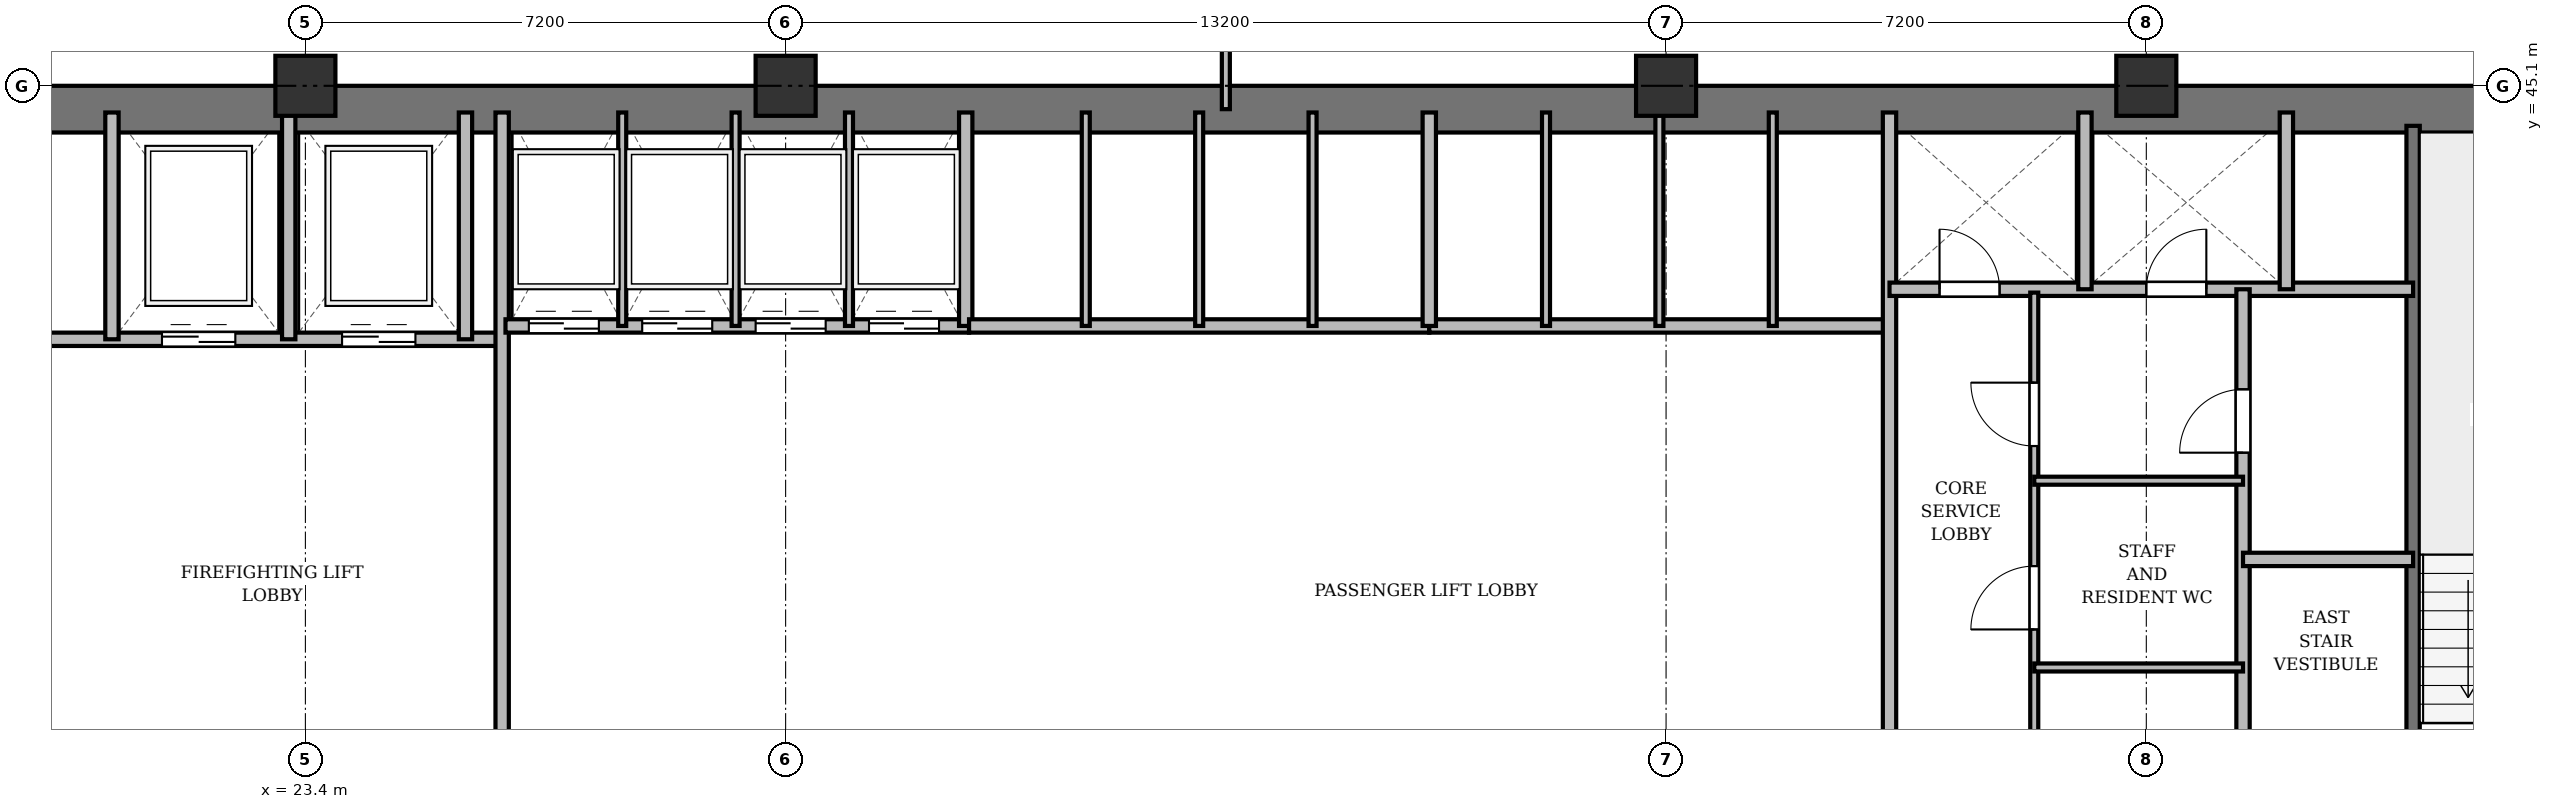
"""IFC4 building model, lengths in metres.
Left out: names, types, materials, properties, quantities, classifications, styles, units other than length and angle.
Written with IfcOpenShell. Run it as: python <this file> out.ifc"""

import sys

from ifc_helpers import new_model, si_unit, direction, frame, frame_2d, origin, origin_2d, place, context, subcontext, project, spatial, rectangle, extrude, source, transform, mapped, element, fill, save


model = new_model("IFC4")
c1 = context("Model", 3, precision=1e-05, world=origin(), true_north=direction((0.0, 1.0)))
c2 = subcontext(c1, "Body", "Model", "MODEL_VIEW")
j1 = project(units=[si_unit("LENGTHUNIT", "METRE"), si_unit("PLANEANGLEUNIT", "RADIAN")], contexts=[c1])
p1 = place(None, origin())
s1 = spatial("IfcSite", under=j1, at=p1, CompositionType="ELEMENT")
p2 = place(p1, origin())
s2 = spatial("IfcBuilding", under=s1, at=p2, CompositionType="ELEMENT")
p3 = place(p2, frame((0.0, 0.0, 63.1)))
s3 = spatial("IfcBuildingStorey", under=s2, at=p3, CompositionType="ELEMENT", Elevation=63.1)
m1 = source(origin(), c2, "Body", "SweptSolid", [
    extrude(rectangle(XDim=0.9, YDim=0.9, at=origin_2d()), origin(), (0.0, 0.0, 1.0), 3.6),
])
for number, where, z_axis, x_axis in (
    (1, (23.4, 45.1, 0.0), (0.0, 0.0, 1.0), (1.0, 0.0, 0.0)),
    (2, (30.6, 45.1, 0.0), (0.0, 0.0, 1.0), (1.0, 0.0, 0.0)),
    (3, (43.8, 45.1, 0.0), (0.0, 0.0, 1.0), (1.0, 0.0, 0.0)),
    (4, (51.0, 45.1, 0.0), (0.0, 0.0, 1.0), (1.0, 0.0, 0.0)),
):
    element("IfcColumn", number, at=place(p3, frame(where, z_axis=z_axis, x_axis=x_axis)), inside=s3, PredefinedType="COLUMN", context=c2, shape_type="MappedRepresentation", body=[
        mapped(m1, transform((0.0, 0.0, 0.0), x_axis=(1.0, 0.0, 0.0), y_axis=(0.0, 1.0, 0.0), z_axis=(0.0, 0.0, 1.0), scale=1.0)),
    ])
p4 = place(p3, frame((15.5, 44.75, 0.0), z_axis=(0.0, 0.0, 1.0), x_axis=(1.0, 0.0, 0.0)))
e5 = element("IfcWall", 5, at=p4, inside=s3, PredefinedType="SHEAR", context=c2, shape_type="SweptSolid", body=[
    extrude(rectangle(XDim=43.4, YDim=0.7, at=frame_2d((21.7, 0.0))), origin(), (0.0, 0.0, 1.0), 3.34),
])
p5 = place(p3, frame((55.0, 33.4, 0.0), z_axis=(0.0, 0.0, 1.0), x_axis=(0.0, 1.0, 0.0)))
e6 = element("IfcWall", 6, at=p5, inside=s3, PredefinedType="SHEAR", context=c2, shape_type="SweptSolid", body=[
    extrude(rectangle(XDim=11.1, YDim=0.2, at=frame_2d((5.55, 0.0))), origin(), (0.0, 0.0, 1.0), 3.34),
])
p6 = place(p5, frame((0.85, 0.0, 0.0)))
e7 = element("IfcOpeningElement", 7, at=p6, cuts=e6, PredefinedType="OPENING", context=c2, shape_type="SweptSolid", body=[
    extrude(rectangle(XDim=1.1, YDim=2.15, at=frame_2d((0.55, 1.075))), frame((0.0, 0.11, 0.0), z_axis=(0.0, -1.0, 0.0), x_axis=(1.0, 0.0, 0.0)), (0.0, 0.0, 1.0), 0.22),
])
p7 = place(p3, frame((19.55, 41.3, 0.0), z_axis=(0.0, 0.0, 1.0), x_axis=(1.0, 0.0, 0.0)))
e8 = element("IfcWall", 8, at=p7, inside=s3, PredefinedType="SOLIDWALL", context=c2, shape_type="SweptSolid", body=[
    extrude(rectangle(XDim=6.75, YDim=0.2, at=frame_2d((3.375, 0.0))), origin(), (0.0, 0.0, 1.0), 3.34),
])
p8 = place(p7, frame((1.7, 0.0, 0.0)))
e9 = element("IfcOpeningElement", 9, at=p8, cuts=e8, PredefinedType="OPENING", context=c2, shape_type="SweptSolid", body=[
    extrude(rectangle(XDim=1.1, YDim=2.15, at=frame_2d((0.55, 1.075))), frame((0.0, 0.11, 0.0), z_axis=(0.0, -1.0, 0.0), x_axis=(1.0, 0.0, 0.0)), (0.0, 0.0, 1.0), 0.22),
])
p9 = place(p7, frame((4.4, 0.0, 0.0)))
e10 = element("IfcOpeningElement", 10, at=p9, cuts=e8, PredefinedType="OPENING", context=c2, shape_type="SweptSolid", body=[
    extrude(rectangle(XDim=1.1, YDim=2.15, at=frame_2d((0.55, 1.075))), frame((0.0, 0.11, 0.0), z_axis=(0.0, -1.0, 0.0), x_axis=(1.0, 0.0, 0.0)), (0.0, 0.0, 1.0), 0.22),
])
for number, where, z_axis, x_axis in (
    (11, (20.5, 41.3, 0.0), (0.0, 0.0, 1.0), (0.0, 1.0, 0.0)),
    (12, (23.15, 41.3, 0.0), (0.0, 0.0, 1.0), (0.0, 1.0, 0.0)),
    (13, (25.8, 41.3, 0.0), (0.0, 0.0, 1.0), (0.0, 1.0, 0.0)),
):
    element("IfcWall", number, at=place(p3, frame(where, z_axis=z_axis, x_axis=x_axis)), inside=s3, PredefinedType="SOLIDWALL", context=c2, shape_type="SweptSolid", body=[
        extrude(rectangle(XDim=3.4, YDim=0.2, at=frame_2d((1.7, 0.0))), origin(), (0.0, 0.0, 1.0), 3.34),
    ])
p10 = place(p3, frame((26.35, 33.4, 0.0), z_axis=(0.0, 0.0, 1.0), x_axis=(0.0, 1.0, 0.0)))
e14 = element("IfcWall", 14, at=p10, inside=s3, PredefinedType="SOLIDWALL", context=c2, shape_type="SweptSolid", body=[
    extrude(rectangle(XDim=11.3, YDim=0.2, at=frame_2d((5.65, 0.0))), origin(), (0.0, 0.0, 1.0), 2.69),
])
p11 = place(p3, frame((26.4, 41.5, 0.0), z_axis=(0.0, 0.0, 1.0), x_axis=(1.0, 0.0, 0.0)))
e15 = element("IfcWall", 15, at=p11, inside=s3, PredefinedType="SOLIDWALL", context=c2, shape_type="SweptSolid", body=[
    extrude(rectangle(XDim=6.95, YDim=0.2, at=frame_2d((3.475, 0.0))), origin(), (0.0, 0.0, 1.0), 3.34),
])
p12 = place(p11, frame((0.35, 0.0, 0.0)))
e16 = element("IfcOpeningElement", 16, at=p12, cuts=e15, PredefinedType="OPENING", context=c2, shape_type="SweptSolid", body=[
    extrude(rectangle(XDim=1.05, YDim=2.15, at=frame_2d((0.525, 1.075))), frame((0.0, 0.11, 0.0), z_axis=(0.0, -1.0, 0.0), x_axis=(1.0, 0.0, 0.0)), (0.0, 0.0, 1.0), 0.22),
])
p13 = place(p11, frame((2.05, 0.0, 0.0)))
e17 = element("IfcOpeningElement", 17, at=p13, cuts=e15, PredefinedType="OPENING", context=c2, shape_type="SweptSolid", body=[
    extrude(rectangle(XDim=1.05, YDim=2.15, at=frame_2d((0.525, 1.075))), frame((0.0, 0.11, 0.0), z_axis=(0.0, -1.0, 0.0), x_axis=(1.0, 0.0, 0.0)), (0.0, 0.0, 1.0), 0.22),
])
p14 = place(p11, frame((3.75, 0.0, 0.0)))
e18 = element("IfcOpeningElement", 18, at=p14, cuts=e15, PredefinedType="OPENING", context=c2, shape_type="SweptSolid", body=[
    extrude(rectangle(XDim=1.05, YDim=2.15, at=frame_2d((0.525, 1.075))), frame((0.0, 0.11, 0.0), z_axis=(0.0, -1.0, 0.0), x_axis=(1.0, 0.0, 0.0)), (0.0, 0.0, 1.0), 0.22),
])
p15 = place(p11, frame((5.45, 0.0, 0.0)))
e19 = element("IfcOpeningElement", 19, at=p15, cuts=e15, PredefinedType="OPENING", context=c2, shape_type="SweptSolid", body=[
    extrude(rectangle(XDim=1.05, YDim=2.15, at=frame_2d((0.525, 1.075))), frame((0.0, 0.11, 0.0), z_axis=(0.0, -1.0, 0.0), x_axis=(1.0, 0.0, 0.0)), (0.0, 0.0, 1.0), 0.22),
])
p16 = place(p3, frame((33.3, 41.5, 0.0), z_axis=(0.0, 0.0, 1.0), x_axis=(0.0, 1.0, 0.0)))
e20 = element("IfcWall", 20, at=p16, inside=s3, PredefinedType="SOLIDWALL", context=c2, shape_type="SweptSolid", body=[
    extrude(rectangle(XDim=3.2, YDim=0.2, at=frame_2d((1.6, 0.0))), origin(), (0.0, 0.0, 1.0), 3.34),
])
for number, where, z_axis, x_axis in (
    (21, (28.15, 41.5, 0.0), (0.0, 0.0, 1.0), (0.0, 1.0, 0.0)),
    (22, (29.85, 41.5, 0.0), (0.0, 0.0, 1.0), (0.0, 1.0, 0.0)),
    (23, (31.55, 41.5, 0.0), (0.0, 0.0, 1.0), (0.0, 1.0, 0.0)),
):
    element("IfcWall", number, at=place(p3, frame(where, z_axis=z_axis, x_axis=x_axis)), inside=s3, PredefinedType="PARTITIONING", context=c2, shape_type="SweptSolid", body=[
        extrude(rectangle(XDim=3.2, YDim=0.12, at=frame_2d((1.6, 0.0))), origin(), (0.0, 0.0, 1.0), 3.34),
    ])
p17 = place(p3, frame((33.35, 41.5, 0.0), z_axis=(0.0, 0.0, 1.0), x_axis=(1.0, 0.0, 0.0)))
e24 = element("IfcWall", 24, at=p17, inside=s3, PredefinedType="SOLIDWALL", context=c2, shape_type="SweptSolid", body=[
    extrude(rectangle(XDim=6.9, YDim=0.2, at=frame_2d((3.45, 0.0))), origin(), (0.0, 0.0, 1.0), 3.34),
])
for number, where, z_axis, x_axis in (
    (25, (35.1, 41.5, 0.0), (0.0, 0.0, 1.0), (0.0, 1.0, 0.0)),
    (26, (36.8, 41.5, 0.0), (0.0, 0.0, 1.0), (0.0, 1.0, 0.0)),
    (27, (38.5, 41.5, 0.0), (0.0, 0.0, 1.0), (0.0, 1.0, 0.0)),
):
    element("IfcWall", number, at=place(p3, frame(where, z_axis=z_axis, x_axis=x_axis)), inside=s3, PredefinedType="PARTITIONING", context=c2, shape_type="SweptSolid", body=[
        extrude(rectangle(XDim=3.2, YDim=0.12, at=frame_2d((1.6, 0.0))), origin(), (0.0, 0.0, 1.0), 3.34),
    ])
p18 = place(p3, frame((40.25, 41.5, 0.0), z_axis=(0.0, 0.0, 1.0), x_axis=(1.0, 0.0, 0.0)))
e28 = element("IfcWall", 28, at=p18, inside=s3, PredefinedType="SOLIDWALL", context=c2, shape_type="SweptSolid", body=[
    extrude(rectangle(XDim=6.9, YDim=0.2, at=frame_2d((3.45, 0.0))), origin(), (0.0, 0.0, 1.0), 2.752),
])
p19 = place(p3, frame((40.25, 41.5, 0.0), z_axis=(0.0, 0.0, 1.0), x_axis=(0.0, 1.0, 0.0)))
e29 = element("IfcWall", 29, at=p19, inside=s3, PredefinedType="SOLIDWALL", context=c2, shape_type="SweptSolid", body=[
    extrude(rectangle(XDim=3.2, YDim=0.2, at=frame_2d((1.6, 0.0))), origin(), (0.0, 0.0, 1.0), 3.34),
])
p20 = place(p3, frame((42.0, 41.5, 0.0), z_axis=(0.0, 0.0, 1.0), x_axis=(0.0, 1.0, 0.0)))
e30 = element("IfcWall", 30, at=p20, inside=s3, PredefinedType="PARTITIONING", context=c2, shape_type="SweptSolid", body=[
    extrude(rectangle(XDim=3.2, YDim=0.12, at=frame_2d((1.6, 0.0))), origin(), (0.0, 0.0, 1.0), 3.34),
])
p21 = place(p3, frame((43.7, 41.5, 0.0), z_axis=(0.0, 0.0, 1.0), x_axis=(0.0, 1.0, 0.0)))
e31 = element("IfcWall", 31, at=p21, inside=s3, PredefinedType="PARTITIONING", context=c2, shape_type="SweptSolid", body=[
    extrude(rectangle(XDim=3.2, YDim=0.12, at=frame_2d((1.6, 0.0))), origin(), (0.0, 0.0, 1.0), 2.752),
])
p22 = place(p3, frame((45.4, 41.5, 0.0), z_axis=(0.0, 0.0, 1.0), x_axis=(0.0, 1.0, 0.0)))
e32 = element("IfcWall", 32, at=p22, inside=s3, PredefinedType="PARTITIONING", context=c2, shape_type="SweptSolid", body=[
    extrude(rectangle(XDim=3.2, YDim=0.12, at=frame_2d((1.6, 0.0))), origin(), (0.0, 0.0, 1.0), 3.34),
])
p23 = place(p3, frame((47.15, 33.4, 0.0), z_axis=(0.0, 0.0, 1.0), x_axis=(0.0, 1.0, 0.0)))
e33 = element("IfcWall", 33, at=p23, inside=s3, PredefinedType="SOLIDWALL", context=c2, shape_type="SweptSolid", body=[
    extrude(rectangle(XDim=11.3, YDim=0.2, at=frame_2d((5.65, 0.0))), origin(), (0.0, 0.0, 1.0), 2.69),
])
p24 = place(p3, frame((47.15, 42.05, 0.0), z_axis=(0.0, 0.0, 1.0), x_axis=(1.0, 0.0, 0.0)))
e34 = element("IfcWall", 34, at=p24, inside=s3, PredefinedType="SOLIDWALL", context=c2, shape_type="SweptSolid", body=[
    extrude(rectangle(XDim=7.85, YDim=0.2, at=frame_2d((3.925, 0.0))), origin(), (0.0, 0.0, 1.0), 2.752),
])
p25 = place(p24, frame((0.75, 0.0, 0.0)))
e35 = element("IfcOpeningElement", 35, at=p25, cuts=e34, PredefinedType="OPENING", context=c2, shape_type="SweptSolid", body=[
    extrude(rectangle(XDim=0.9, YDim=2.1, at=frame_2d((0.45, 1.05))), frame((0.0, 0.11, 0.0), z_axis=(0.0, -1.0, 0.0), x_axis=(1.0, 0.0, 0.0)), (0.0, 0.0, 1.0), 0.22),
])
p26 = place(p24, frame((3.85, 0.0, 0.0)))
e36 = element("IfcOpeningElement", 36, at=p26, cuts=e34, PredefinedType="OPENING", context=c2, shape_type="SweptSolid", body=[
    extrude(rectangle(XDim=0.9, YDim=2.1, at=frame_2d((0.45, 1.05))), frame((0.0, 0.11, 0.0), z_axis=(0.0, -1.0, 0.0), x_axis=(1.0, 0.0, 0.0)), (0.0, 0.0, 1.0), 0.22),
])
for number, where, z_axis, x_axis in (
    (37, (50.08, 42.05, 0.0), (0.0, 0.0, 1.0), (0.0, 1.0, 0.0)),
    (38, (53.1, 42.05, 0.0), (0.0, 0.0, 1.0), (0.0, 1.0, 0.0)),
):
    element("IfcWall", number, at=place(p3, frame(where, z_axis=z_axis, x_axis=x_axis)), inside=s3, PredefinedType="SOLIDWALL", context=c2, shape_type="SweptSolid", body=[
        extrude(rectangle(XDim=2.65, YDim=0.2, at=frame_2d((1.325, 0.0))), origin(), (0.0, 0.0, 1.0), 3.34),
    ])
p27 = place(p3, frame((52.45, 33.4, 0.0), z_axis=(0.0, 0.0, 1.0), x_axis=(0.0, 1.0, 0.0)))
e39 = element("IfcWall", 39, at=p27, inside=s3, PredefinedType="PARTITIONING", context=c2, shape_type="SweptSolid", body=[
    extrude(rectangle(XDim=8.65, YDim=0.2, at=frame_2d((4.325, 0.0))), origin(), (0.0, 0.0, 1.0), 2.69),
])
p28 = place(p27, frame((6.2, 0.0, 0.0)))
e40 = element("IfcOpeningElement", 40, at=p28, cuts=e39, PredefinedType="OPENING", context=c2, shape_type="SweptSolid", body=[
    extrude(rectangle(XDim=0.95, YDim=2.15, at=frame_2d((0.475, 1.075))), frame((0.0, 0.11, 0.0), z_axis=(0.0, -1.0, 0.0), x_axis=(1.0, 0.0, 0.0)), (0.0, 0.0, 1.0), 0.22),
])
p29 = place(p3, frame((52.45, 38.0, 0.0), z_axis=(0.0, 0.0, 1.0), x_axis=(1.0, 0.0, 0.0)))
e41 = element("IfcWall", 41, at=p29, inside=s3, PredefinedType="PARTITIONING", context=c2, shape_type="SweptSolid", body=[
    extrude(rectangle(XDim=2.55, YDim=0.2, at=frame_2d((1.275, 0.0))), origin(), (0.0, 0.0, 1.0), 3.34),
])
p30 = place(p3, frame((49.32, 33.4, 0.0), z_axis=(0.0, 0.0, 1.0), x_axis=(0.0, 1.0, 0.0)))
e42 = element("IfcWall", 42, at=p30, inside=s3, PredefinedType="PARTITIONING", context=c2, shape_type="SweptSolid", body=[
    extrude(rectangle(XDim=8.6, YDim=0.12, at=frame_2d((4.3, 0.0))), origin(), (0.0, 0.0, 1.0), 2.69),
])
p31 = place(p30, frame((0.85, 0.0, 0.0)))
e43 = element("IfcOpeningElement", 43, at=p31, cuts=e42, PredefinedType="OPENING", context=c2, shape_type="SweptSolid", body=[
    extrude(rectangle(XDim=0.95, YDim=2.15, at=frame_2d((0.475, 1.075))), frame((0.0, 0.07, 0.0), z_axis=(0.0, -1.0, 0.0), x_axis=(1.0, 0.0, 0.0)), (0.0, 0.0, 1.0), 0.14),
])
p32 = place(p30, frame((3.55, 0.0, 0.0)))
e44 = element("IfcOpeningElement", 44, at=p32, cuts=e42, PredefinedType="OPENING", context=c2, shape_type="SweptSolid", body=[
    extrude(rectangle(XDim=0.95, YDim=2.15, at=frame_2d((0.475, 1.075))), frame((0.0, 0.07, 0.0), z_axis=(0.0, -1.0, 0.0), x_axis=(1.0, 0.0, 0.0)), (0.0, 0.0, 1.0), 0.14),
])
p33 = place(p30, frame((6.3, 0.0, 0.0)))
e45 = element("IfcOpeningElement", 45, at=p33, cuts=e42, PredefinedType="OPENING", context=c2, shape_type="SweptSolid", body=[
    extrude(rectangle(XDim=0.95, YDim=2.15, at=frame_2d((0.475, 1.075))), frame((0.0, 0.07, 0.0), z_axis=(0.0, -1.0, 0.0), x_axis=(1.0, 0.0, 0.0)), (0.0, 0.0, 1.0), 0.14),
])
for number, where, z_axis, x_axis in (
    (46, (49.32, 36.38, 0.0), (0.0, 0.0, 1.0), (1.0, 0.0, 0.0)),
    (47, (49.32, 39.18, 0.0), (0.0, 0.0, 1.0), (1.0, 0.0, 0.0)),
):
    element("IfcWall", number, at=place(p3, frame(where, z_axis=z_axis, x_axis=x_axis)), inside=s3, PredefinedType="PARTITIONING", context=c2, shape_type="SweptSolid", body=[
        extrude(rectangle(XDim=3.13, YDim=0.12, at=frame_2d((1.565, 0.0))), origin(), (0.0, 0.0, 1.0), 2.752),
    ])
p34 = place(p3, frame((37.2, 44.75, 0.0), z_axis=(0.0, 0.0, 1.0), x_axis=(0.0, 1.0, 0.0)))
e48 = element("IfcWall", 48, at=p34, inside=s3, PredefinedType="PARTITIONING", context=c2, shape_type="SweptSolid", body=[
    extrude(rectangle(XDim=3.61, YDim=0.12, at=frame_2d((1.805, 0.0))), origin(), (0.0, 0.0, 1.0), 2.69),
])
p35 = place(p34, frame((1.1, 0.0, 0.0)))
e49 = element("IfcOpeningElement", 49, at=p35, cuts=e48, PredefinedType="OPENING", context=c2, shape_type="SweptSolid", body=[
    extrude(rectangle(XDim=0.95, YDim=2.15, at=frame_2d((0.475, 1.075))), frame((0.0, 0.07, 0.0), z_axis=(0.0, -1.0, 0.0), x_axis=(1.0, 0.0, 0.0)), (0.0, 0.0, 1.0), 0.14),
])
m2 = source(origin(), c2, "Body", "SweptSolid", [
    extrude(rectangle(XDim=1.1, YDim=2.15, at=frame_2d((0.55, 1.075))), frame((0.0, 0.025, 0.0), z_axis=(0.0, -1.0, 0.0), x_axis=(1.0, 0.0, 0.0)), (0.0, 0.0, 1.0), 0.05),
])
p36 = place(p8, origin())
e50 = element("IfcDoor", 50, at=p36, inside=s3, OperationType="DOUBLE_DOOR_SLIDING", PredefinedType="DOOR", context=c2, shape_type="MappedRepresentation", body=[
    mapped(m2, transform((0.0, 0.0, 0.0), x_axis=(1.0, 0.0, 0.0), y_axis=(0.0, 1.0, 0.0), z_axis=(0.0, 0.0, 1.0), scale=1.0)),
])
fill(e9, e50)
p37 = place(p9, origin())
e51 = element("IfcDoor", 51, at=p37, inside=s3, OperationType="DOUBLE_DOOR_SLIDING", PredefinedType="DOOR", context=c2, shape_type="MappedRepresentation", body=[
    mapped(m2, transform((0.0, 0.0, 0.0), x_axis=(1.0, 0.0, 0.0), y_axis=(0.0, 1.0, 0.0), z_axis=(0.0, 0.0, 1.0), scale=1.0)),
])
fill(e10, e51)
m3 = source(origin(), c2, "Body", "SweptSolid", [
    extrude(rectangle(XDim=1.05, YDim=2.15, at=frame_2d((0.525, 1.075))), frame((0.0, 0.025, 0.0), z_axis=(0.0, -1.0, 0.0), x_axis=(1.0, 0.0, 0.0)), (0.0, 0.0, 1.0), 0.05),
])
p38 = place(p12, origin())
e52 = element("IfcDoor", 52, at=p38, inside=s3, OperationType="DOUBLE_DOOR_SLIDING", PredefinedType="DOOR", context=c2, shape_type="MappedRepresentation", body=[
    mapped(m3, transform((0.0, 0.0, 0.0), x_axis=(1.0, 0.0, 0.0), y_axis=(0.0, 1.0, 0.0), z_axis=(0.0, 0.0, 1.0), scale=1.0)),
])
fill(e16, e52)
p39 = place(p13, origin())
e53 = element("IfcDoor", 53, at=p39, inside=s3, OperationType="DOUBLE_DOOR_SLIDING", PredefinedType="DOOR", context=c2, shape_type="MappedRepresentation", body=[
    mapped(m3, transform((0.0, 0.0, 0.0), x_axis=(1.0, 0.0, 0.0), y_axis=(0.0, 1.0, 0.0), z_axis=(0.0, 0.0, 1.0), scale=1.0)),
])
fill(e17, e53)
p40 = place(p14, origin())
e54 = element("IfcDoor", 54, at=p40, inside=s3, OperationType="DOUBLE_DOOR_SLIDING", PredefinedType="DOOR", context=c2, shape_type="MappedRepresentation", body=[
    mapped(m3, transform((0.0, 0.0, 0.0), x_axis=(1.0, 0.0, 0.0), y_axis=(0.0, 1.0, 0.0), z_axis=(0.0, 0.0, 1.0), scale=1.0)),
])
fill(e18, e54)
p41 = place(p15, origin())
e55 = element("IfcDoor", 55, at=p41, inside=s3, OperationType="DOUBLE_DOOR_SLIDING", PredefinedType="DOOR", context=c2, shape_type="MappedRepresentation", body=[
    mapped(m3, transform((0.0, 0.0, 0.0), x_axis=(1.0, 0.0, 0.0), y_axis=(0.0, 1.0, 0.0), z_axis=(0.0, 0.0, 1.0), scale=1.0)),
])
fill(e19, e55)
m4 = source(origin(), c2, "Body", "SweptSolid", [
    extrude(rectangle(XDim=0.9, YDim=2.1, at=frame_2d((0.45, 1.05))), frame((0.0, 0.025, 0.0), z_axis=(0.0, -1.0, 0.0), x_axis=(1.0, 0.0, 0.0)), (0.0, 0.0, 1.0), 0.05),
])
p42 = place(p25, origin())
e56 = element("IfcDoor", 56, at=p42, inside=s3, OperationType="SINGLE_SWING_LEFT", PredefinedType="DOOR", context=c2, shape_type="MappedRepresentation", body=[
    mapped(m4, transform((0.0, 0.0, 0.0), x_axis=(1.0, 0.0, 0.0), y_axis=(0.0, 1.0, 0.0), z_axis=(0.0, 0.0, 1.0), scale=1.0)),
])
fill(e35, e56)
p43 = place(p26, origin())
e57 = element("IfcDoor", 57, at=p43, inside=s3, OperationType="SINGLE_SWING_RIGHT", PredefinedType="DOOR", context=c2, shape_type="MappedRepresentation", body=[
    mapped(m4, transform((0.0, 0.0, 0.0), x_axis=(1.0, 0.0, 0.0), y_axis=(0.0, 1.0, 0.0), z_axis=(0.0, 0.0, 1.0), scale=1.0)),
])
fill(e36, e57)
m5 = source(origin(), c2, "Body", "SweptSolid", [
    extrude(rectangle(XDim=0.95, YDim=2.15, at=frame_2d((0.475, 1.075))), frame((0.0, 0.025, 0.0), z_axis=(0.0, -1.0, 0.0), x_axis=(1.0, 0.0, 0.0)), (0.0, 0.0, 1.0), 0.05),
])
p44 = place(p28, origin())
e58 = element("IfcDoor", 58, at=p44, inside=s3, OperationType="SINGLE_SWING_LEFT", PredefinedType="DOOR", context=c2, shape_type="MappedRepresentation", body=[
    mapped(m5, transform((0.0, 0.0, 0.0), x_axis=(1.0, 0.0, 0.0), y_axis=(0.0, 1.0, 0.0), z_axis=(0.0, 0.0, 1.0), scale=1.0)),
])
fill(e40, e58)
p45 = place(p32, origin())
e59 = element("IfcDoor", 59, at=p45, inside=s3, OperationType="SINGLE_SWING_LEFT", PredefinedType="DOOR", context=c2, shape_type="MappedRepresentation", body=[
    mapped(m5, transform((0.0, 0.0, 0.0), x_axis=(1.0, 0.0, 0.0), y_axis=(0.0, 1.0, 0.0), z_axis=(0.0, 0.0, 1.0), scale=1.0)),
])
fill(e44, e59)
p46 = place(p33, origin())
e60 = element("IfcDoor", 60, at=p46, inside=s3, OperationType="SINGLE_SWING_RIGHT", PredefinedType="DOOR", context=c2, shape_type="MappedRepresentation", body=[
    mapped(m5, transform((0.0, 0.0, 0.0), x_axis=(1.0, 0.0, 0.0), y_axis=(0.0, 1.0, 0.0), z_axis=(0.0, 0.0, 1.0), scale=1.0)),
])
fill(e45, e60)
save(model, sys.argv[1])
